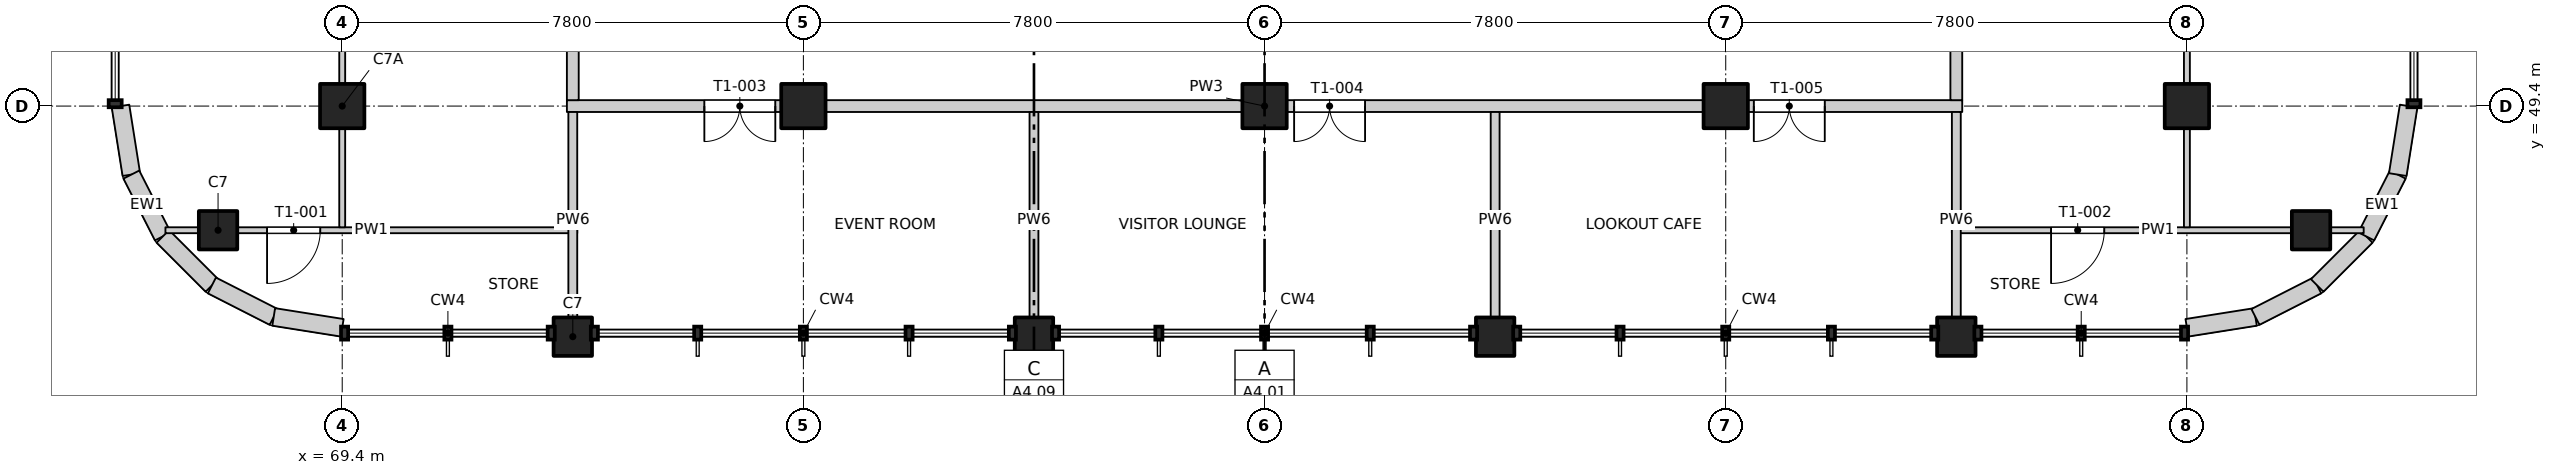
"""IFC4 building model, lengths in metres.
Left out: names, types, materials, properties, quantities, classifications, styles, units other than length and angle.
Written with IfcOpenShell. Run it as: python <this file> out.ifc"""

import sys

from ifc_helpers import new_model, si_unit, direction, frame, frame_2d, origin, origin_2d, place, context, subcontext, project, spatial, rectangle, extrude, element, fill, save


model = new_model("IFC4")
c1 = context("Model", 3, precision=1e-05, world=origin(), true_north=direction((0.0, 1.0)))
c2 = subcontext(c1, "Body", "Model", "MODEL_VIEW")
j1 = project(units=[si_unit("LENGTHUNIT", "METRE"), si_unit("PLANEANGLEUNIT", "RADIAN")], contexts=[c1])
p1 = place(None, origin())
s1 = spatial("IfcSite", under=j1, at=p1, CompositionType="ELEMENT")
p2 = place(p1, origin())
s2 = spatial("IfcBuilding", under=s1, at=p2, CompositionType="ELEMENT")
p3 = place(p2, frame((0.0, 0.0, 263.0)))
s3 = spatial("IfcBuildingStorey", under=s2, at=p3, CompositionType="ELEMENT", Elevation=263.0)
for number, where, z_axis, x_axis in (
    (1, (67.3, 47.3, -0.25), (0.0, 0.0, 1.0), (1.0, 0.0, 0.0)),
    (2, (102.7, 47.3, -0.25), (0.0, 0.0, 1.0), (1.0, 0.0, 0.0)),
    (3, (73.3, 45.5, -0.25), (0.0, 0.0, 1.0), (1.0, 0.0, 0.0)),
    (4, (81.1, 45.5, -0.25), (0.0, 0.0, 1.0), (1.0, 0.0, 0.0)),
    (5, (88.9, 45.5, -0.25), (0.0, 0.0, 1.0), (1.0, 0.0, 0.0)),
    (6, (96.7, 45.5, -0.25), (0.0, 0.0, 1.0), (1.0, 0.0, 0.0)),
):
    element("IfcColumn", number, at=place(p3, frame(where, z_axis=z_axis, x_axis=x_axis)), inside=s3, PredefinedType="COLUMN", context=c2, shape_type="SweptSolid", body=[
        extrude(rectangle(XDim=0.65, YDim=0.65, at=origin_2d()), origin(), (0.0, 0.0, 1.0), 3.35),
    ])
for number, where, z_axis, x_axis in (
    (7, (69.4, 49.4, -0.25), (0.0, 0.0, 1.0), (1.0, 0.0, 0.0)),
    (8, (77.2, 49.4, -0.25), (0.0, 0.0, 1.0), (1.0, 0.0, 0.0)),
    (9, (85.0, 49.4, -0.25), (0.0, 0.0, 1.0), (1.0, 0.0, 0.0)),
    (10, (92.8, 49.4, -0.25), (0.0, 0.0, 1.0), (1.0, 0.0, 0.0)),
    (11, (100.6, 49.4, -0.25), (0.0, 0.0, 1.0), (1.0, 0.0, 0.0)),
):
    element("IfcColumn", number, at=place(p3, frame(where, z_axis=z_axis, x_axis=x_axis)), inside=s3, PredefinedType="COLUMN", context=c2, shape_type="SweptSolid", body=[
        extrude(rectangle(XDim=0.75, YDim=0.75, at=origin_2d()), origin(), (0.0, 0.0, 1.0), 3.35),
    ])
p4 = place(p3, frame((100.6, 45.65, 0.0), z_axis=(0.0, 0.0, 1.0), x_axis=(0.987678452879, 0.156496880861, 0.0)))
e12 = element("IfcWall", 12, at=p4, inside=s3, PredefinedType="SOLIDWALL", context=c2, shape_type="SweptSolid", body=[
    extrude(rectangle(XDim=1.173, YDim=0.3, at=frame_2d((0.586, 0.0))), origin(), (0.0, 0.0, 1.0), 3.1),
])
p5 = place(p3, frame((101.759, 45.833, 0.0), z_axis=(0.0, 0.0, 1.0), x_axis=(0.890988677504, 0.454025524128, 0.0)))
e13 = element("IfcWall", 13, at=p5, inside=s3, PredefinedType="SOLIDWALL", context=c2, shape_type="SweptSolid", body=[
    extrude(rectangle(XDim=1.173, YDim=0.3, at=frame_2d((0.587, 0.0))), origin(), (0.0, 0.0, 1.0), 3.1),
])
p6 = place(p3, frame((102.804, 46.366, 0.0), z_axis=(0.0, 0.0, 1.0), x_axis=(0.707106781187, 0.707106781187, 0.0)))
e14 = element("IfcWall", 14, at=p6, inside=s3, PredefinedType="SOLIDWALL", context=c2, shape_type="SweptSolid", body=[
    extrude(rectangle(XDim=1.173, YDim=0.3, at=frame_2d((0.586, 0.0))), origin(), (0.0, 0.0, 1.0), 3.1),
])
p7 = place(p3, frame((103.634, 47.196, 0.0), z_axis=(0.0, 0.0, 1.0), x_axis=(0.454025524128, 0.890988677504, 0.0)))
e15 = element("IfcWall", 15, at=p7, inside=s3, PredefinedType="SOLIDWALL", context=c2, shape_type="SweptSolid", body=[
    extrude(rectangle(XDim=1.173, YDim=0.3, at=frame_2d((0.587, 0.0))), origin(), (0.0, 0.0, 1.0), 3.1),
])
for number, where, z_axis, x_axis in (
    (16, (104.167, 48.241, 0.0), (0.0, 0.0, 1.0), (0.156, 0.988, 0.0)),
    (17, (65.65, 49.4, 0.0), (0.0, 0.0, 1.0), (0.156, -0.988, 0.0)),
):
    element("IfcWall", number, at=place(p3, frame(where, z_axis=z_axis, x_axis=x_axis)), inside=s3, PredefinedType="SOLIDWALL", context=c2, shape_type="SweptSolid", body=[
        extrude(rectangle(XDim=1.173, YDim=0.3, at=frame_2d((0.586, 0.0))), origin(), (0.0, 0.0, 1.0), 3.1),
    ])
p8 = place(p3, frame((65.833, 48.241, 0.0), z_axis=(0.0, 0.0, 1.0), x_axis=(0.454025524128, -0.890988677504, 0.0)))
e18 = element("IfcWall", 18, at=p8, inside=s3, PredefinedType="SOLIDWALL", context=c2, shape_type="SweptSolid", body=[
    extrude(rectangle(XDim=1.173, YDim=0.3, at=frame_2d((0.587, 0.0))), origin(), (0.0, 0.0, 1.0), 3.1),
])
p9 = place(p3, frame((66.366, 47.196, 0.0), z_axis=(0.0, 0.0, 1.0), x_axis=(0.707106781187, -0.707106781187, 0.0)))
e19 = element("IfcWall", 19, at=p9, inside=s3, PredefinedType="SOLIDWALL", context=c2, shape_type="SweptSolid", body=[
    extrude(rectangle(XDim=1.173, YDim=0.3, at=frame_2d((0.586, 0.0))), origin(), (0.0, 0.0, 1.0), 3.1),
])
p10 = place(p3, frame((67.196, 46.366, 0.0), z_axis=(0.0, 0.0, 1.0), x_axis=(0.890988677504, -0.454025524128, 0.0)))
e20 = element("IfcWall", 20, at=p10, inside=s3, PredefinedType="SOLIDWALL", context=c2, shape_type="SweptSolid", body=[
    extrude(rectangle(XDim=1.173, YDim=0.3, at=frame_2d((0.587, 0.0))), origin(), (0.0, 0.0, 1.0), 3.1),
])
p11 = place(p3, frame((68.241, 45.833, 0.0), z_axis=(0.0, 0.0, 1.0), x_axis=(0.987678452879, -0.156496880861, 0.0)))
e21 = element("IfcWall", 21, at=p11, inside=s3, PredefinedType="SOLIDWALL", context=c2, shape_type="SweptSolid", body=[
    extrude(rectangle(XDim=1.173, YDim=0.3, at=frame_2d((0.586, 0.0))), origin(), (0.0, 0.0, 1.0), 3.1),
])
p12 = place(p3, frame((66.41, 47.3, 0.0), z_axis=(0.0, 0.0, 1.0), x_axis=(1.0, 0.0, 0.0)))
e22 = element("IfcWall", 22, at=p12, inside=s3, PredefinedType="PARTITIONING", context=c2, shape_type="SweptSolid", body=[
    extrude(rectangle(XDim=6.965, YDim=0.1, at=frame_2d((3.482, 0.0))), origin(), (0.0, 0.0, 1.0), 3.1),
])
p13 = place(p12, frame((1.719, 0.0, 0.0)))
e23 = element("IfcOpeningElement", 23, at=p13, cuts=e22, PredefinedType="OPENING", context=c2, shape_type="SweptSolid", body=[
    extrude(rectangle(XDim=0.9, YDim=2.1, at=frame_2d((0.45, 1.05))), frame((0.0, 0.06, 0.0), z_axis=(0.0, -1.0, 0.0), x_axis=(1.0, 0.0, 0.0)), (0.0, 0.0, 1.0), 0.12),
])
p14 = place(p3, frame((96.625, 47.3, 0.0), z_axis=(0.0, 0.0, 1.0), x_axis=(1.0, 0.0, 0.0)))
e24 = element("IfcWall", 24, at=p14, inside=s3, PredefinedType="PARTITIONING", context=c2, shape_type="SweptSolid", body=[
    extrude(rectangle(XDim=6.965, YDim=0.1, at=frame_2d((3.482, 0.0))), origin(), (0.0, 0.0, 1.0), 3.1),
])
p15 = place(p14, frame((1.678, 0.0, 0.0)))
e25 = element("IfcOpeningElement", 25, at=p15, cuts=e24, PredefinedType="OPENING", context=c2, shape_type="SweptSolid", body=[
    extrude(rectangle(XDim=0.9, YDim=2.1, at=frame_2d((0.45, 1.05))), frame((0.0, 0.06, 0.0), z_axis=(0.0, -1.0, 0.0), x_axis=(1.0, 0.0, 0.0)), (0.0, 0.0, 1.0), 0.12),
])
p16 = place(p3, frame((73.2, 49.4, 0.0), z_axis=(0.0, 0.0, 1.0), x_axis=(1.0, 0.0, 0.0)))
e26 = element("IfcWall", 26, at=p16, inside=s3, PredefinedType="PARTITIONING", context=c2, shape_type="SweptSolid", body=[
    extrude(rectangle(XDim=23.6, YDim=0.2, at=frame_2d((11.8, 0.0))), origin(), (0.0, 0.0, 1.0), 3.1),
])
p17 = place(p16, frame((2.325, 0.0, 0.0)))
e27 = element("IfcOpeningElement", 27, at=p17, cuts=e26, PredefinedType="OPENING", context=c2, shape_type="SweptSolid", body=[
    extrude(rectangle(XDim=1.2, YDim=2.1, at=frame_2d((0.6, 1.05))), frame((0.0, 0.11, 0.0), z_axis=(0.0, -1.0, 0.0), x_axis=(1.0, 0.0, 0.0)), (0.0, 0.0, 1.0), 0.22),
])
p18 = place(p16, frame((12.3, 0.0, 0.0)))
e28 = element("IfcOpeningElement", 28, at=p18, cuts=e26, PredefinedType="OPENING", context=c2, shape_type="SweptSolid", body=[
    extrude(rectangle(XDim=1.2, YDim=2.1, at=frame_2d((0.6, 1.05))), frame((0.0, 0.11, 0.0), z_axis=(0.0, -1.0, 0.0), x_axis=(1.0, 0.0, 0.0)), (0.0, 0.0, 1.0), 0.22),
])
p19 = place(p16, frame((20.075, 0.0, 0.0)))
e29 = element("IfcOpeningElement", 29, at=p19, cuts=e26, PredefinedType="OPENING", context=c2, shape_type="SweptSolid", body=[
    extrude(rectangle(XDim=1.2, YDim=2.1, at=frame_2d((0.6, 1.05))), frame((0.0, 0.11, 0.0), z_axis=(0.0, -1.0, 0.0), x_axis=(1.0, 0.0, 0.0)), (0.0, 0.0, 1.0), 0.22),
])
p20 = place(p3, frame((69.4, 47.35, 0.0), z_axis=(0.0, 0.0, 1.0), x_axis=(0.0, 1.0, 0.0)))
e30 = element("IfcWall", 30, at=p20, inside=s3, PredefinedType="PARTITIONING", context=c2, shape_type="SweptSolid", body=[
    extrude(rectangle(XDim=29.3, YDim=0.1, at=frame_2d((14.65, 0.0))), origin(), (0.0, 0.0, 1.0), 3.1),
])
p21 = place(p20, frame((5.35, 0.0, 0.0)))
e31 = element("IfcOpeningElement", 31, at=p21, cuts=e30, PredefinedType="OPENING", context=c2, shape_type="SweptSolid", body=[
    extrude(rectangle(XDim=1.2, YDim=2.1, at=frame_2d((0.6, 1.05))), frame((0.0, 0.06, 0.0), z_axis=(0.0, -1.0, 0.0), x_axis=(1.0, 0.0, 0.0)), (0.0, 0.0, 1.0), 0.12),
])
p22 = place(p20, frame((20.3, 0.0, 0.0)))
e32 = element("IfcOpeningElement", 32, at=p22, cuts=e30, PredefinedType="OPENING", context=c2, shape_type="SweptSolid", body=[
    extrude(rectangle(XDim=0.9, YDim=2.1, at=frame_2d((0.45, 1.05))), frame((0.0, 0.06, 0.0), z_axis=(0.0, -1.0, 0.0), x_axis=(1.0, 0.0, 0.0)), (0.0, 0.0, 1.0), 0.12),
])
p23 = place(p20, frame((21.9, 0.0, 0.0)))
e33 = element("IfcOpeningElement", 33, at=p23, cuts=e30, PredefinedType="OPENING", context=c2, shape_type="SweptSolid", body=[
    extrude(rectangle(XDim=0.9, YDim=2.1, at=frame_2d((0.45, 1.05))), frame((0.0, 0.06, 0.0), z_axis=(0.0, -1.0, 0.0), x_axis=(1.0, 0.0, 0.0)), (0.0, 0.0, 1.0), 0.12),
])
p24 = place(p3, frame((73.3, 45.635, 0.0), z_axis=(0.0, 0.0, 1.0), x_axis=(0.0, 1.0, 0.0)))
e34 = element("IfcWall", 34, at=p24, inside=s3, PredefinedType="PARTITIONING", context=c2, shape_type="SweptSolid", body=[
    extrude(rectangle(XDim=3.665, YDim=0.15, at=frame_2d((1.833, 0.0))), origin(), (0.0, 0.0, 1.0), 3.1),
])
p25 = place(p3, frame((73.3, 49.5, 0.0), z_axis=(0.0, 0.0, 1.0), x_axis=(0.0, 1.0, 0.0)))
e35 = element("IfcWall", 35, at=p25, inside=s3, PredefinedType="PARTITIONING", context=c2, shape_type="SweptSolid", body=[
    extrude(rectangle(XDim=34.865, YDim=0.2, at=frame_2d((17.433, 0.0))), origin(), (0.0, 0.0, 1.0), 3.1),
])
p26 = place(p25, frame((6.2, 0.0, 0.0)))
e36 = element("IfcOpeningElement", 36, at=p26, cuts=e35, PredefinedType="OPENING", context=c2, shape_type="SweptSolid", body=[
    extrude(rectangle(XDim=1.2, YDim=2.1, at=frame_2d((0.6, 1.05))), frame((0.0, 0.11, 0.0), z_axis=(0.0, -1.0, 0.0), x_axis=(1.0, 0.0, 0.0)), (0.0, 0.0, 1.0), 0.22),
])
p27 = place(p25, frame((12.95, 0.0, 0.0)))
e37 = element("IfcOpeningElement", 37, at=p27, cuts=e35, PredefinedType="OPENING", context=c2, shape_type="SweptSolid", body=[
    extrude(rectangle(XDim=1.2, YDim=2.1, at=frame_2d((0.6, 1.05))), frame((0.0, 0.11, 0.0), z_axis=(0.0, -1.0, 0.0), x_axis=(1.0, 0.0, 0.0)), (0.0, 0.0, 1.0), 0.22),
])
p28 = place(p25, frame((24.65, 0.0, 0.0)))
e38 = element("IfcOpeningElement", 38, at=p28, cuts=e35, PredefinedType="OPENING", context=c2, shape_type="SweptSolid", body=[
    extrude(rectangle(XDim=1.2, YDim=2.1, at=frame_2d((0.6, 1.05))), frame((0.0, 0.11, 0.0), z_axis=(0.0, -1.0, 0.0), x_axis=(1.0, 0.0, 0.0)), (0.0, 0.0, 1.0), 0.22),
])
p29 = place(p25, frame((27.571, 0.0, 0.0)))
e39 = element("IfcOpeningElement", 39, at=p29, cuts=e35, PredefinedType="OPENING", context=c2, shape_type="SweptSolid", body=[
    extrude(rectangle(XDim=0.9, YDim=2.1, at=frame_2d((0.45, 1.05))), frame((0.0, 0.11, 0.0), z_axis=(0.0, -1.0, 0.0), x_axis=(1.0, 0.0, 0.0)), (0.0, 0.0, 1.0), 0.22),
])
p30 = place(p25, frame((32.45, 0.0, 0.0)))
e40 = element("IfcOpeningElement", 40, at=p30, cuts=e35, PredefinedType="OPENING", context=c2, shape_type="SweptSolid", body=[
    extrude(rectangle(XDim=1.2, YDim=2.1, at=frame_2d((0.6, 1.05))), frame((0.0, 0.11, 0.0), z_axis=(0.0, -1.0, 0.0), x_axis=(1.0, 0.0, 0.0)), (0.0, 0.0, 1.0), 0.22),
])
for number, where, z_axis, x_axis in (
    (41, (81.1, 45.635, 0.0), (0.0, 0.0, 1.0), (0.0, 1.0, 0.0)),
    (42, (88.9, 45.635, 0.0), (0.0, 0.0, 1.0), (0.0, 1.0, 0.0)),
    (43, (96.7, 45.635, 0.0), (0.0, 0.0, 1.0), (0.0, 1.0, 0.0)),
):
    element("IfcWall", number, at=place(p3, frame(where, z_axis=z_axis, x_axis=x_axis)), inside=s3, PredefinedType="PARTITIONING", context=c2, shape_type="SweptSolid", body=[
        extrude(rectangle(XDim=3.665, YDim=0.15, at=frame_2d((1.833, 0.0))), origin(), (0.0, 0.0, 1.0), 3.1),
    ])
p31 = place(p3, frame((96.7, 49.5, 0.0), z_axis=(0.0, 0.0, 1.0), x_axis=(0.0, 1.0, 0.0)))
e44 = element("IfcWall", 44, at=p31, inside=s3, PredefinedType="PARTITIONING", context=c2, shape_type="SweptSolid", body=[
    extrude(rectangle(XDim=34.865, YDim=0.2, at=frame_2d((17.433, 0.0))), origin(), (0.0, 0.0, 1.0), 3.1),
])
p32 = place(p31, frame((9.05, 0.0, 0.0)))
e45 = element("IfcOpeningElement", 45, at=p32, cuts=e44, PredefinedType="OPENING", context=c2, shape_type="SweptSolid", body=[
    extrude(rectangle(XDim=1.2, YDim=2.1, at=frame_2d((0.6, 1.05))), frame((0.0, 0.11, 0.0), z_axis=(0.0, -1.0, 0.0), x_axis=(1.0, 0.0, 0.0)), (0.0, 0.0, 1.0), 0.22),
])
p33 = place(p31, frame((20.75, 0.0, 0.0)))
e46 = element("IfcOpeningElement", 46, at=p33, cuts=e44, PredefinedType="OPENING", context=c2, shape_type="SweptSolid", body=[
    extrude(rectangle(XDim=1.2, YDim=2.1, at=frame_2d((0.6, 1.05))), frame((0.0, 0.11, 0.0), z_axis=(0.0, -1.0, 0.0), x_axis=(1.0, 0.0, 0.0)), (0.0, 0.0, 1.0), 0.22),
])
p34 = place(p31, frame((24.65, 0.0, 0.0)))
e47 = element("IfcOpeningElement", 47, at=p34, cuts=e44, PredefinedType="OPENING", context=c2, shape_type="SweptSolid", body=[
    extrude(rectangle(XDim=1.2, YDim=2.1, at=frame_2d((0.6, 1.05))), frame((0.0, 0.11, 0.0), z_axis=(0.0, -1.0, 0.0), x_axis=(1.0, 0.0, 0.0)), (0.0, 0.0, 1.0), 0.22),
])
p35 = place(p31, frame((31.825, 0.0, 0.0)))
e48 = element("IfcOpeningElement", 48, at=p35, cuts=e44, PredefinedType="OPENING", context=c2, shape_type="SweptSolid", body=[
    extrude(rectangle(XDim=1.2, YDim=2.1, at=frame_2d((0.6, 1.05))), frame((0.0, 0.11, 0.0), z_axis=(0.0, -1.0, 0.0), x_axis=(1.0, 0.0, 0.0)), (0.0, 0.0, 1.0), 0.22),
])
p36 = place(p31, frame((33.65, 0.0, 0.0)))
e49 = element("IfcOpeningElement", 49, at=p36, cuts=e44, PredefinedType="OPENING", context=c2, shape_type="SweptSolid", body=[
    extrude(rectangle(XDim=0.9, YDim=2.1, at=frame_2d((0.45, 1.05))), frame((0.0, 0.11, 0.0), z_axis=(0.0, -1.0, 0.0), x_axis=(1.0, 0.0, 0.0)), (0.0, 0.0, 1.0), 0.22),
])
p37 = place(p3, frame((100.6, 47.35, 0.0), z_axis=(0.0, 0.0, 1.0), x_axis=(0.0, 1.0, 0.0)))
e50 = element("IfcWall", 50, at=p37, inside=s3, PredefinedType="PARTITIONING", context=c2, shape_type="SweptSolid", body=[
    extrude(rectangle(XDim=25.4, YDim=0.1, at=frame_2d((12.7, 0.0))), origin(), (0.0, 0.0, 1.0), 3.1),
])
p38 = place(p37, frame((5.35, 0.0, 0.0)))
e51 = element("IfcOpeningElement", 51, at=p38, cuts=e50, PredefinedType="OPENING", context=c2, shape_type="SweptSolid", body=[
    extrude(rectangle(XDim=1.2, YDim=2.1, at=frame_2d((0.6, 1.05))), frame((0.0, 0.06, 0.0), z_axis=(0.0, -1.0, 0.0), x_axis=(1.0, 0.0, 0.0)), (0.0, 0.0, 1.0), 0.12),
])
p39 = place(p37, frame((21.017, 0.0, 0.0)))
e52 = element("IfcOpeningElement", 52, at=p39, cuts=e50, PredefinedType="OPENING", context=c2, shape_type="SweptSolid", body=[
    extrude(rectangle(XDim=1.2, YDim=2.1, at=frame_2d((0.6, 1.05))), frame((0.0, 0.06, 0.0), z_axis=(0.0, -1.0, 0.0), x_axis=(1.0, 0.0, 0.0)), (0.0, 0.0, 1.0), 0.12),
])
p40 = place(p13, origin())
e53 = element("IfcDoor", 53, at=p40, inside=s3, OperationType="SINGLE_SWING_RIGHT", PredefinedType="DOOR", context=c2, shape_type="SweptSolid", body=[
    extrude(rectangle(XDim=0.9, YDim=2.1, at=frame_2d((0.45, 1.05))), frame((0.0, 0.025, 0.0), z_axis=(0.0, -1.0, 0.0), x_axis=(1.0, 0.0, 0.0)), (0.0, 0.0, 1.0), 0.05),
])
fill(e23, e53)
p41 = place(p15, origin())
e54 = element("IfcDoor", 54, at=p41, inside=s3, OperationType="SINGLE_SWING_RIGHT", PredefinedType="DOOR", context=c2, shape_type="SweptSolid", body=[
    extrude(rectangle(XDim=0.9, YDim=2.1, at=frame_2d((0.45, 1.05))), frame((0.0, 0.025, 0.0), z_axis=(0.0, -1.0, 0.0), x_axis=(1.0, 0.0, 0.0)), (0.0, 0.0, 1.0), 0.05),
])
fill(e25, e54)
p42 = place(p17, origin())
e55 = element("IfcDoor", 55, at=p42, inside=s3, OperationType="DOUBLE_DOOR_SINGLE_SWING", PredefinedType="DOOR", context=c2, shape_type="SweptSolid", body=[
    extrude(rectangle(XDim=1.2, YDim=2.1, at=frame_2d((0.6, 1.05))), frame((0.0, 0.025, 0.0), z_axis=(0.0, -1.0, 0.0), x_axis=(1.0, 0.0, 0.0)), (0.0, 0.0, 1.0), 0.05),
])
fill(e27, e55)
p43 = place(p18, origin())
e56 = element("IfcDoor", 56, at=p43, inside=s3, OperationType="DOUBLE_DOOR_SINGLE_SWING", PredefinedType="DOOR", context=c2, shape_type="SweptSolid", body=[
    extrude(rectangle(XDim=1.2, YDim=2.1, at=frame_2d((0.6, 1.05))), frame((0.0, 0.025, 0.0), z_axis=(0.0, -1.0, 0.0), x_axis=(1.0, 0.0, 0.0)), (0.0, 0.0, 1.0), 0.05),
])
fill(e28, e56)
p44 = place(p19, origin())
e57 = element("IfcDoor", 57, at=p44, inside=s3, OperationType="DOUBLE_DOOR_SINGLE_SWING", PredefinedType="DOOR", context=c2, shape_type="SweptSolid", body=[
    extrude(rectangle(XDim=1.2, YDim=2.1, at=frame_2d((0.6, 1.05))), frame((0.0, 0.025, 0.0), z_axis=(0.0, -1.0, 0.0), x_axis=(1.0, 0.0, 0.0)), (0.0, 0.0, 1.0), 0.05),
])
fill(e29, e57)
save(model, sys.argv[1])
